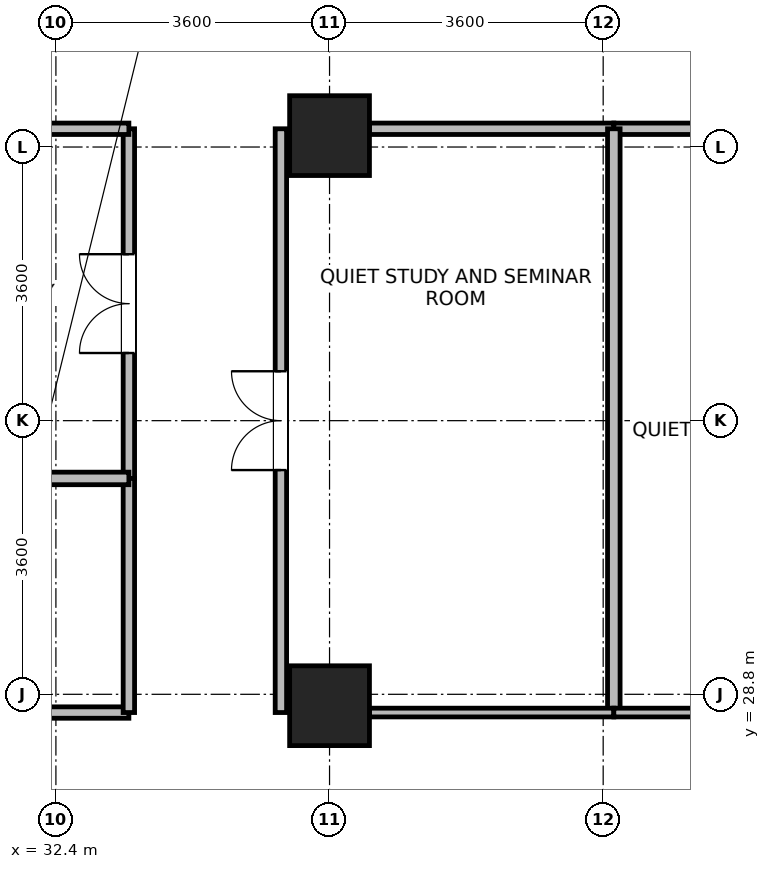
"""IFC4 building model, lengths in metres.
Left out: names, types, materials, properties, quantities, classifications, styles, units other than length and angle.
Written with IfcOpenShell. Run it as: python <this file> out.ifc"""

import sys

from ifc_helpers import new_model, si_unit, direction, frame, frame_2d, origin, origin_2d, place, context, subcontext, project, spatial, rectangle, extrude, source, transform, mapped, element, fill, save


model = new_model("IFC4")
c1 = context("Model", 3, precision=1e-05, world=origin(), true_north=direction((0.0, 1.0)))
c2 = subcontext(c1, "Body", "Model", "MODEL_VIEW")
j1 = project(units=[si_unit("LENGTHUNIT", "METRE"), si_unit("PLANEANGLEUNIT", "RADIAN")], contexts=[c1])
p1 = place(None, origin())
s1 = spatial("IfcSite", under=j1, at=p1, CompositionType="ELEMENT")
p2 = place(p1, origin())
s2 = spatial("IfcBuilding", under=s1, at=p2, CompositionType="ELEMENT")
p3 = place(p2, frame((0.0, 0.0, 135.6)))
s3 = spatial("IfcBuildingStorey", under=s2, at=p3, CompositionType="ELEMENT", Elevation=135.6)
m1 = source(origin(), c2, "Body", "SweptSolid", [
    extrude(rectangle(XDim=1.05, YDim=1.05, at=origin_2d()), origin(), (0.0, 0.0, 1.0), 4.6),
])
for number, where, z_axis, x_axis in (
    (1, (36.0, 28.65, 0.0), (0.0, 0.0, 1.0), (1.0, 0.0, 0.0)),
    (2, (36.0, 36.15, 0.0), (0.0, 0.0, 1.0), (1.0, 0.0, 0.0)),
):
    element("IfcColumn", number, at=place(p3, frame(where, z_axis=z_axis, x_axis=x_axis)), inside=s3, PredefinedType="COLUMN", context=c2, shape_type="MappedRepresentation", body=[
        mapped(m1, transform((0.0, 0.0, 0.0), x_axis=(1.0, 0.0, 0.0), y_axis=(0.0, 1.0, 0.0), z_axis=(0.0, 0.0, 1.0), scale=1.0)),
    ])
p4 = place(p3, frame((35.36, 28.56, 0.0), z_axis=(0.0, 0.0, 1.0), x_axis=(0.0, 1.0, 0.0)))
e3 = element("IfcWall", 3, at=p4, inside=s3, PredefinedType="PARTITIONING", context=c2, shape_type="SweptSolid", body=[
    extrude(rectangle(XDim=7.68, YDim=0.15, at=frame_2d((3.84, 0.0))), origin(), (0.0, 0.0, 1.0), 4.34),
])
p5 = place(p4, frame((3.19, 0.0, 0.0)))
e4 = element("IfcOpeningElement", 4, at=p5, cuts=e3, PredefinedType="OPENING", context=c2, shape_type="SweptSolid", body=[
    extrude(rectangle(XDim=1.3, YDim=2.12, at=frame_2d((0.65, 1.06))), frame((0.0, 0.085, 0.0), z_axis=(0.0, -1.0, 0.0), x_axis=(1.0, 0.0, 0.0)), (0.0, 0.0, 1.0), 0.17),
])
p6 = place(p3, frame((33.36, 31.64, 0.0), z_axis=(0.0, 0.0, 1.0), x_axis=(0.0, 1.0, 0.0)))
e5 = element("IfcWall", 5, at=p6, inside=s3, PredefinedType="PARTITIONING", context=c2, shape_type="SweptSolid", body=[
    extrude(rectangle(XDim=4.6, YDim=0.15, at=frame_2d((2.3, 0.0))), origin(), (0.0, 0.0, 1.0), 4.34),
])
p7 = place(p6, frame((1.65, 0.0, 0.0)))
e6 = element("IfcOpeningElement", 6, at=p7, cuts=e5, PredefinedType="OPENING", context=c2, shape_type="SweptSolid", body=[
    extrude(rectangle(XDim=1.3, YDim=2.12, at=frame_2d((0.65, 1.06))), frame((0.0, 0.085, 0.0), z_axis=(0.0, -1.0, 0.0), x_axis=(1.0, 0.0, 0.0)), (0.0, 0.0, 1.0), 0.17),
])
p8 = place(p3, frame((29.325, 28.56, 0.0), z_axis=(0.0, 0.0, 1.0), x_axis=(1.0, 0.0, 0.0)))
e7 = element("IfcWall", 7, at=p8, inside=s3, PredefinedType="PARTITIONING", context=c2, shape_type="SweptSolid", body=[
    extrude(rectangle(XDim=4.035, YDim=0.15, at=frame_2d((2.018, 0.0))), origin(), (0.0, 0.0, 1.0), 3.74),
])
p9 = place(p8, frame((1.587, 0.0, 0.0)))
e8 = element("IfcOpeningElement", 8, at=p9, cuts=e7, PredefinedType="OPENING", context=c2, shape_type="SweptSolid", body=[
    extrude(rectangle(XDim=0.86, YDim=2.02, at=frame_2d((0.43, 1.01))), frame((0.0, 0.085, 0.0), z_axis=(0.0, -1.0, 0.0), x_axis=(1.0, 0.0, 0.0)), (0.0, 0.0, 1.0), 0.17),
])
p10 = place(p3, frame((29.325, 36.24, 0.0), z_axis=(0.0, 0.0, 1.0), x_axis=(1.0, 0.0, 0.0)))
e9 = element("IfcWall", 9, at=p10, inside=s3, PredefinedType="PARTITIONING", context=c2, shape_type="SweptSolid", body=[
    extrude(rectangle(XDim=4.035, YDim=0.15, at=frame_2d((2.018, 0.0))), origin(), (0.0, 0.0, 1.0), 3.74),
])
p11 = place(p3, frame((36.525, 36.24, 0.0), z_axis=(0.0, 0.0, 1.0), x_axis=(1.0, 0.0, 0.0)))
e10 = element("IfcWall", 10, at=p11, inside=s3, PredefinedType="PARTITIONING", context=c2, shape_type="SweptSolid", body=[
    extrude(rectangle(XDim=3.215, YDim=0.15, at=frame_2d((1.607, 0.0))), origin(), (0.0, 0.0, 1.0), 3.74),
])
p12 = place(p3, frame((39.74, 36.24, 0.0), z_axis=(0.0, 0.0, 1.0), x_axis=(1.0, 0.0, 0.0)))
e11 = element("IfcWall", 11, at=p12, inside=s3, PredefinedType="PARTITIONING", context=c2, shape_type="SweptSolid", body=[
    extrude(rectangle(XDim=4.06, YDim=0.15, at=frame_2d((2.03, 0.0))), origin(), (0.0, 0.0, 1.0), 3.74),
])
p13 = place(p12, frame((1.38, 0.0, 0.0)))
e12 = element("IfcOpeningElement", 12, at=p13, cuts=e11, PredefinedType="OPENING", context=c2, shape_type="SweptSolid", body=[
    extrude(rectangle(XDim=1.3, YDim=2.12, at=frame_2d((0.65, 1.06))), frame((0.0, 0.085, 0.0), z_axis=(0.0, -1.0, 0.0), x_axis=(1.0, 0.0, 0.0)), (0.0, 0.0, 1.0), 0.17),
])
p14 = place(p3, frame((33.36, 28.56, 0.0), z_axis=(0.0, 0.0, 1.0), x_axis=(0.0, 1.0, 0.0)))
e13 = element("IfcWall", 13, at=p14, inside=s3, PredefinedType="PARTITIONING", context=c2, shape_type="SweptSolid", body=[
    extrude(rectangle(XDim=3.08, YDim=0.15, at=frame_2d((1.54, 0.0))), origin(), (0.0, 0.0, 1.0), 4.34),
])
p15 = place(p3, frame((39.74, 28.56, 0.0), z_axis=(0.0, 0.0, 1.0), x_axis=(0.0, 1.0, 0.0)))
e14 = element("IfcWall", 14, at=p15, inside=s3, PredefinedType="PARTITIONING", context=c2, shape_type="SweptSolid", body=[
    extrude(rectangle(XDim=7.68, YDim=0.165, at=frame_2d((3.84, 0.0))), origin(), (0.0, 0.0, 1.0), 4.34),
])
p16 = place(p3, frame((28.84, 31.64, 0.0), z_axis=(0.0, 0.0, 1.0), x_axis=(1.0, 0.0, 0.0)))
e15 = element("IfcWall", 15, at=p16, inside=s3, PredefinedType="PARTITIONING", context=c2, shape_type="SweptSolid", body=[
    extrude(rectangle(XDim=4.52, YDim=0.165, at=frame_2d((2.26, 0.0))), origin(), (0.0, 0.0, 1.0), 4.34),
])
p17 = place(p3, frame((36.525, 28.56, 0.0), z_axis=(0.0, 0.0, 1.0), x_axis=(1.0, 0.0, 0.0)))
e16 = element("IfcWall", 16, at=p17, inside=s3, PredefinedType="PARTITIONING", context=c2, shape_type="SweptSolid", body=[
    extrude(rectangle(XDim=3.215, YDim=0.115, at=frame_2d((1.607, 0.0))), origin(), (0.0, 0.0, 1.0), 3.74),
])
p18 = place(p3, frame((39.74, 28.56, 0.0), z_axis=(0.0, 0.0, 1.0), x_axis=(1.0, 0.0, 0.0)))
e17 = element("IfcWall", 17, at=p18, inside=s3, PredefinedType="PARTITIONING", context=c2, shape_type="SweptSolid", body=[
    extrude(rectangle(XDim=4.06, YDim=0.115, at=frame_2d((2.03, 0.0))), origin(), (0.0, 0.0, 1.0), 3.74),
])
p19 = place(p5, origin())
e18 = element("IfcDoor", 18, at=p19, inside=s3, OperationType="DOUBLE_DOOR_SINGLE_SWING", PredefinedType="DOOR", context=c2, shape_type="SweptSolid", body=[
    extrude(rectangle(XDim=1.3, YDim=2.12, at=frame_2d((0.65, 1.06))), frame((0.0, 0.025, 0.0), z_axis=(0.0, -1.0, 0.0), x_axis=(1.0, 0.0, 0.0)), (0.0, 0.0, 1.0), 0.05),
])
fill(e4, e18)
p20 = place(p7, origin())
e19 = element("IfcDoor", 19, at=p20, inside=s3, OperationType="DOUBLE_DOOR_SINGLE_SWING", PredefinedType="DOOR", context=c2, shape_type="SweptSolid", body=[
    extrude(rectangle(XDim=1.3, YDim=2.12, at=frame_2d((0.65, 1.06))), frame((0.0, 0.025, 0.0), z_axis=(0.0, -1.0, 0.0), x_axis=(1.0, 0.0, 0.0)), (0.0, 0.0, 1.0), 0.05),
])
fill(e6, e19)
save(model, sys.argv[1])
